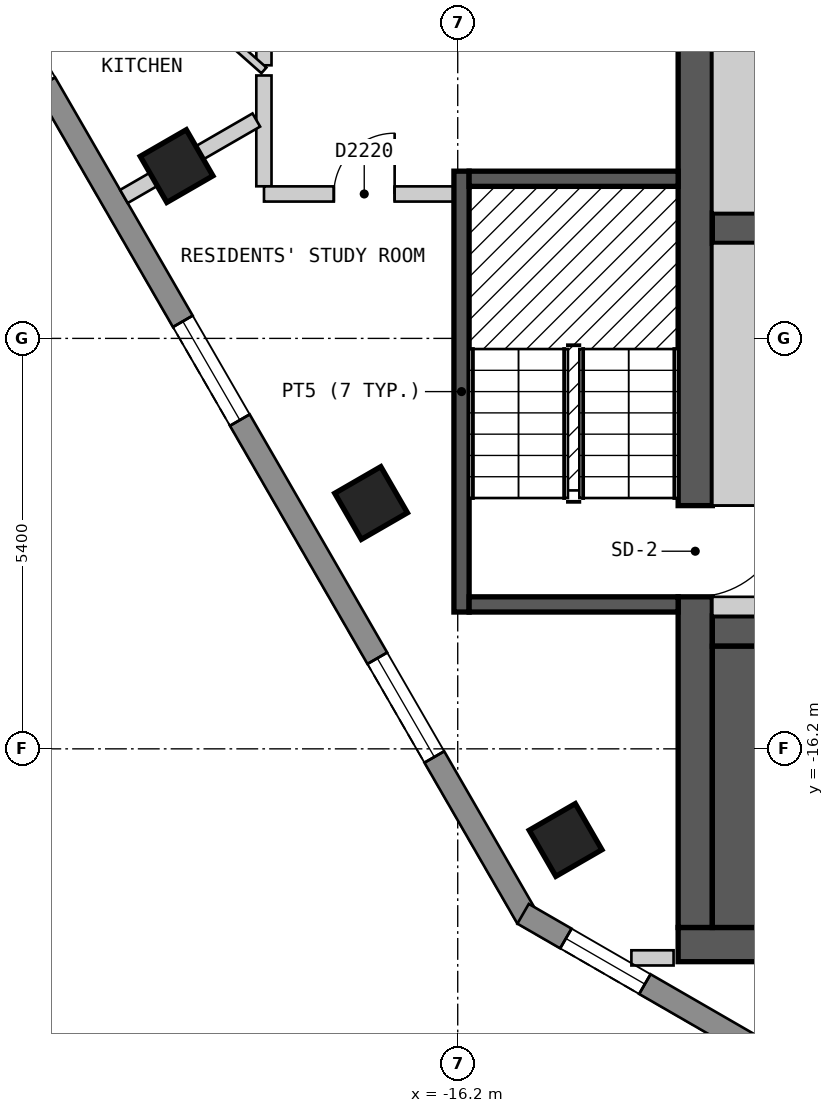
"""IFC4 building model, lengths in metres.
Left out: names, types, materials, properties, quantities, classifications, styles, units other than length and angle.
Written with IfcOpenShell. Run it as: python <this file> out.ifc"""

import sys

from ifc_helpers import new_model, si_unit, direction, frame, frame_2d, origin, origin_2d, place, context, subcontext, project, spatial, polyline, rectangle, outline, extrude, element, fill, save


model = new_model("IFC4")
c1 = context("Model", 3, precision=1e-05, world=origin(), true_north=direction((0.0, 1.0)))
c2 = subcontext(c1, "Body", "Model", "MODEL_VIEW")
j1 = project(units=[si_unit("LENGTHUNIT", "METRE"), si_unit("PLANEANGLEUNIT", "RADIAN")], contexts=[c1])
p1 = place(None, origin())
s1 = spatial("IfcSite", under=j1, at=p1, CompositionType="ELEMENT")
p2 = place(p1, origin())
s2 = spatial("IfcBuilding", under=s1, at=p2, CompositionType="ELEMENT")
p3 = place(p2, frame((0.0, 0.0, 223.8)))
s3 = spatial("IfcBuildingStorey", under=s2, at=p3, CompositionType="ELEMENT", Elevation=223.8)
for number, where, z_axis, x_axis in (
    (1, (-19.899, -8.533, 0.0), (0.0, 0.0, 1.0), (0.5, -0.866, 0.0)),
    (2, (-17.34, -12.966, 0.0), (0.0, 0.0, 1.0), (0.5, -0.866, 0.0)),
    (3, (-14.781, -17.399, 0.0), (0.0, 0.0, 1.0), (0.5, -0.866, 0.0)),
):
    element("IfcColumn", number, at=place(p3, frame(where, z_axis=z_axis, x_axis=x_axis)), inside=s3, PredefinedType="COLUMN", context=c2, shape_type="SweptSolid", body=[
        extrude(rectangle(XDim=0.7, YDim=0.7, at=origin_2d()), origin(), (0.0, 0.0, 1.0), 3.0),
    ])
p4 = place(p3, frame((-13.3, -18.775, 0.0), z_axis=(0.0, 0.0, 1.0), x_axis=(1.0, 0.0, 0.0)))
e4 = element("IfcWall", 4, at=p4, inside=s3, PredefinedType="SHEAR", context=c2, shape_type="SweptSolid", body=[
    extrude(rectangle(XDim=26.6, YDim=0.45, at=frame_2d((13.3, 0.0))), origin(), (0.0, 0.0, 1.0), 2.7),
])
p5 = place(p4, frame((9.3, 0.0, 0.0)))
e5 = element("IfcOpeningElement", 5, at=p5, cuts=e4, PredefinedType="OPENING", context=c2, shape_type="SweptSolid", body=[
    extrude(rectangle(XDim=0.9, YDim=2.1, at=frame_2d((0.45, 1.05))), frame((0.0, 0.235, 0.0), z_axis=(0.0, -1.0, 0.0), x_axis=(1.0, 0.0, 0.0)), (0.0, 0.0, 1.0), 0.47),
])
p6 = place(p3, frame((-13.075, -18.55, 0.0), z_axis=(0.0, 0.0, 1.0), x_axis=(0.0, 1.0, 0.0)))
e6 = element("IfcWall", 6, at=p6, inside=s3, PredefinedType="SHEAR", context=c2, shape_type="SweptSolid", body=[
    extrude(rectangle(XDim=13.1, YDim=0.45, at=frame_2d((6.55, 0.0))), origin(), (0.0, 0.0, 1.0), 2.7),
])
p7 = place(p6, frame((4.35, 0.0, 0.0)))
e7 = element("IfcOpeningElement", 7, at=p7, cuts=e6, PredefinedType="OPENING", context=c2, shape_type="SweptSolid", body=[
    extrude(rectangle(XDim=1.2, YDim=2.1, at=frame_2d((0.6, 1.05))), frame((0.0, 0.235, 0.0), z_axis=(0.0, -1.0, 0.0), x_axis=(1.0, 0.0, 0.0)), (0.0, 0.0, 1.0), 0.47),
])
p8 = place(p3, frame((-12.85, -14.65, 0.0), z_axis=(0.0, 0.0, 1.0), x_axis=(1.0, 0.0, 0.0)))
e8 = element("IfcWall", 8, at=p8, inside=s3, PredefinedType="SHEAR", context=c2, shape_type="SweptSolid", body=[
    extrude(rectangle(XDim=25.7, YDim=0.4, at=frame_2d((12.85, 0.0))), origin(), (0.0, 0.0, 1.0), 2.7),
])
p9 = place(p8, frame((2.05, 0.0, 0.0), z_axis=(0.0, 0.0, 1.0), x_axis=(-1.0, 0.0, 0.0)))
e9 = element("IfcOpeningElement", 9, at=p9, cuts=e8, PredefinedType="OPENING", context=c2, shape_type="SweptSolid", body=[
    extrude(rectangle(XDim=1.2, YDim=2.1, at=frame_2d((0.6, 1.05))), frame((0.0, 0.21, 0.0), z_axis=(0.0, -1.0, 0.0), x_axis=(1.0, 0.0, 0.0)), (0.0, 0.0, 1.0), 0.42),
])
p10 = place(p8, frame((24.9, 0.0, 0.0), z_axis=(0.0, 0.0, 1.0), x_axis=(-1.0, 0.0, 0.0)))
e10 = element("IfcOpeningElement", 10, at=p10, cuts=e8, PredefinedType="OPENING", context=c2, shape_type="SweptSolid", body=[
    extrude(rectangle(XDim=1.2, YDim=2.1, at=frame_2d((0.6, 1.05))), frame((0.0, 0.21, 0.0), z_axis=(0.0, -1.0, 0.0), x_axis=(1.0, 0.0, 0.0)), (0.0, 0.0, 1.0), 0.42),
])
p11 = place(p8, frame((8.75, 0.0, 0.0), z_axis=(0.0, 0.0, 1.0), x_axis=(-1.0, 0.0, 0.0)))
e11 = element("IfcOpeningElement", 11, at=p11, cuts=e8, PredefinedType="OPENING", context=c2, shape_type="SweptSolid", body=[
    extrude(rectangle(XDim=1.0, YDim=2.1, at=frame_2d((0.5, 1.05))), frame((0.0, 0.21, 0.0), z_axis=(0.0, -1.0, 0.0), x_axis=(1.0, 0.0, 0.0)), (0.0, 0.0, 1.0), 0.42),
])
p12 = place(p8, frame((11.5, 0.0, 0.0), z_axis=(0.0, 0.0, 1.0), x_axis=(-1.0, 0.0, 0.0)))
e12 = element("IfcOpeningElement", 12, at=p12, cuts=e8, PredefinedType="OPENING", context=c2, shape_type="SweptSolid", body=[
    extrude(rectangle(XDim=0.9, YDim=2.1, at=frame_2d((0.45, 1.05))), frame((0.0, 0.21, 0.0), z_axis=(0.0, -1.0, 0.0), x_axis=(1.0, 0.0, 0.0)), (0.0, 0.0, 1.0), 0.42),
])
p13 = place(p8, frame((14.3, 0.0, 0.0), z_axis=(0.0, 0.0, 1.0), x_axis=(-1.0, 0.0, 0.0)))
e13 = element("IfcOpeningElement", 13, at=p13, cuts=e8, PredefinedType="OPENING", context=c2, shape_type="SweptSolid", body=[
    extrude(rectangle(XDim=1.0, YDim=2.1, at=frame_2d((0.5, 1.05))), frame((0.0, 0.21, 0.0), z_axis=(0.0, -1.0, 0.0), x_axis=(1.0, 0.0, 0.0)), (0.0, 0.0, 1.0), 0.42),
])
p14 = place(p8, frame((17.9, 0.0, 0.0), z_axis=(0.0, 0.0, 1.0), x_axis=(-1.0, 0.0, 0.0)))
e14 = element("IfcOpeningElement", 14, at=p14, cuts=e8, PredefinedType="OPENING", context=c2, shape_type="SweptSolid", body=[
    extrude(rectangle(XDim=1.0, YDim=2.1, at=frame_2d((0.5, 1.05))), frame((0.0, 0.21, 0.0), z_axis=(0.0, -1.0, 0.0), x_axis=(1.0, 0.0, 0.0)), (0.0, 0.0, 1.0), 0.42),
])
p15 = place(p3, frame((-12.85, -9.35, 0.0), z_axis=(0.0, 0.0, 1.0), x_axis=(1.0, 0.0, 0.0)))
e15 = element("IfcWall", 15, at=p15, inside=s3, PredefinedType="SHEAR", context=c2, shape_type="SweptSolid", body=[
    extrude(rectangle(XDim=23.05, YDim=0.4, at=frame_2d((11.525, 0.0))), origin(), (0.0, 0.0, 1.0), 2.7),
])
p16 = place(p15, frame((1.45, 0.0, 0.0)))
e16 = element("IfcOpeningElement", 16, at=p16, cuts=e15, PredefinedType="OPENING", context=c2, shape_type="SweptSolid", body=[
    extrude(rectangle(XDim=1.1, YDim=2.1, at=frame_2d((0.55, 1.05))), frame((0.0, 0.21, 0.0), z_axis=(0.0, -1.0, 0.0), x_axis=(1.0, 0.0, 0.0)), (0.0, 0.0, 1.0), 0.42),
])
p17 = place(p15, frame((4.25, 0.0, 0.0)))
e17 = element("IfcOpeningElement", 17, at=p17, cuts=e15, PredefinedType="OPENING", context=c2, shape_type="SweptSolid", body=[
    extrude(rectangle(XDim=1.1, YDim=2.1, at=frame_2d((0.55, 1.05))), frame((0.0, 0.21, 0.0), z_axis=(0.0, -1.0, 0.0), x_axis=(1.0, 0.0, 0.0)), (0.0, 0.0, 1.0), 0.42),
])
p18 = place(p15, frame((7.05, 0.0, 0.0)))
e18 = element("IfcOpeningElement", 18, at=p18, cuts=e15, PredefinedType="OPENING", context=c2, shape_type="SweptSolid", body=[
    extrude(rectangle(XDim=1.1, YDim=2.1, at=frame_2d((0.55, 1.05))), frame((0.0, 0.21, 0.0), z_axis=(0.0, -1.0, 0.0), x_axis=(1.0, 0.0, 0.0)), (0.0, 0.0, 1.0), 0.42),
])
p19 = place(p15, frame((9.35, 0.0, 0.0)))
e19 = element("IfcOpeningElement", 19, at=p19, cuts=e15, PredefinedType="OPENING", context=c2, shape_type="SweptSolid", body=[
    extrude(rectangle(XDim=1.1, YDim=2.1, at=frame_2d((0.55, 1.05))), frame((0.0, 0.21, 0.0), z_axis=(0.0, -1.0, 0.0), x_axis=(1.0, 0.0, 0.0)), (0.0, 0.0, 1.0), 0.42),
])
p20 = place(p15, frame((11.65, 0.0, 0.0)))
e20 = element("IfcOpeningElement", 20, at=p20, cuts=e15, PredefinedType="OPENING", context=c2, shape_type="SweptSolid", body=[
    extrude(rectangle(XDim=1.1, YDim=2.1, at=frame_2d((0.55, 1.05))), frame((0.0, 0.21, 0.0), z_axis=(0.0, -1.0, 0.0), x_axis=(1.0, 0.0, 0.0)), (0.0, 0.0, 1.0), 0.42),
])
p21 = place(p15, frame((13.95, 0.0, 0.0)))
e21 = element("IfcOpeningElement", 21, at=p21, cuts=e15, PredefinedType="OPENING", context=c2, shape_type="SweptSolid", body=[
    extrude(rectangle(XDim=1.1, YDim=2.1, at=frame_2d((0.55, 1.05))), frame((0.0, 0.21, 0.0), z_axis=(0.0, -1.0, 0.0), x_axis=(1.0, 0.0, 0.0)), (0.0, 0.0, 1.0), 0.42),
])
p22 = place(p15, frame((16.25, 0.0, 0.0)))
e22 = element("IfcOpeningElement", 22, at=p22, cuts=e15, PredefinedType="OPENING", context=c2, shape_type="SweptSolid", body=[
    extrude(rectangle(XDim=1.1, YDim=2.1, at=frame_2d((0.55, 1.05))), frame((0.0, 0.21, 0.0), z_axis=(0.0, -1.0, 0.0), x_axis=(1.0, 0.0, 0.0)), (0.0, 0.0, 1.0), 0.42),
])
p23 = place(p15, frame((18.55, 0.0, 0.0)))
e23 = element("IfcOpeningElement", 23, at=p23, cuts=e15, PredefinedType="OPENING", context=c2, shape_type="SweptSolid", body=[
    extrude(rectangle(XDim=1.1, YDim=2.1, at=frame_2d((0.55, 1.05))), frame((0.0, 0.21, 0.0), z_axis=(0.0, -1.0, 0.0), x_axis=(1.0, 0.0, 0.0)), (0.0, 0.0, 1.0), 0.42),
])
p24 = place(p15, frame((20.95, 0.0, 0.0)))
e24 = element("IfcOpeningElement", 24, at=p24, cuts=e15, PredefinedType="OPENING", context=c2, shape_type="SweptSolid", body=[
    extrude(rectangle(XDim=1.1, YDim=2.1, at=frame_2d((0.55, 1.05))), frame((0.0, 0.21, 0.0), z_axis=(0.0, -1.0, 0.0), x_axis=(1.0, 0.0, 0.0)), (0.0, 0.0, 1.0), 0.42),
])
p25 = place(p3, frame((-23.599, -4.025, 0.0), z_axis=(0.0, 0.0, 1.0), x_axis=(0.500012653391, -0.866018098222, 0.0)))
e25 = element("IfcWall", 25, at=p25, inside=s3, PredefinedType="SOLIDWALL", context=c2, shape_type="SweptSolid", body=[
    extrude(outline(polyline([(0.0, -0.15), (16.628, -0.15), (16.548, 0.15), (0.08, 0.15), (0.0, -0.15)])), origin(), (0.0, 0.0, 1.0), 2.7),
])
p26 = place(p25, frame((2.444, 0.0, 0.15)))
e26 = element("IfcOpeningElement", 26, at=p26, cuts=e25, PredefinedType="OPENING", context=c2, shape_type="SweptSolid", body=[
    extrude(rectangle(XDim=1.5, YDim=2.1, at=frame_2d((0.75, 1.05))), frame((0.0, 0.16, 0.0), z_axis=(0.0, -1.0, 0.0), x_axis=(1.0, 0.0, 0.0)), (0.0, 0.0, 1.0), 0.32),
])
p27 = place(p25, frame((7.564, 0.0, 0.15)))
e27 = element("IfcOpeningElement", 27, at=p27, cuts=e25, PredefinedType="OPENING", context=c2, shape_type="SweptSolid", body=[
    extrude(rectangle(XDim=1.5, YDim=2.1, at=frame_2d((0.75, 1.05))), frame((0.0, 0.16, 0.0), z_axis=(0.0, -1.0, 0.0), x_axis=(1.0, 0.0, 0.0)), (0.0, 0.0, 1.0), 0.32),
])
p28 = place(p25, frame((12.682, 0.0, 0.15)))
e28 = element("IfcOpeningElement", 28, at=p28, cuts=e25, PredefinedType="OPENING", context=c2, shape_type="SweptSolid", body=[
    extrude(rectangle(XDim=1.5, YDim=2.1, at=frame_2d((0.75, 1.05))), frame((0.0, 0.16, 0.0), z_axis=(0.0, -1.0, 0.0), x_axis=(1.0, 0.0, 0.0)), (0.0, 0.0, 1.0), 0.32),
])
p29 = place(p3, frame((-15.34, -18.37, 0.0), z_axis=(0.0, 0.0, 1.0), x_axis=(0.866022959057, -0.500004234368, 0.0)))
e29 = element("IfcWall", 29, at=p29, inside=s3, PredefinedType="SOLIDWALL", context=c2, shape_type="SweptSolid", body=[
    extrude(outline(polyline([(0.0, -0.15), (5.0, -0.15), (4.92, 0.15), (0.08, 0.15), (0.0, -0.15)])), origin(), (0.0, 0.0, 1.0), 2.7),
])
p30 = place(p29, frame((0.65, 0.0, 0.15)))
e30 = element("IfcOpeningElement", 30, at=p30, cuts=e29, PredefinedType="OPENING", context=c2, shape_type="SweptSolid", body=[
    extrude(rectangle(XDim=1.2, YDim=2.1, at=frame_2d((0.6, 1.05))), frame((0.0, 0.16, 0.0), z_axis=(0.0, -1.0, 0.0), x_axis=(1.0, 0.0, 0.0)), (0.0, 0.0, 1.0), 0.32),
])
p31 = place(p3, frame((-18.75, -7.341, 0.0), z_axis=(0.0, 0.0, 1.0), x_axis=(0.0, -1.0, 0.0)))
e31 = element("IfcWall", 31, at=p31, inside=s3, PredefinedType="PARTITIONING", context=c2, shape_type="SweptSolid", body=[
    extrude(rectangle(XDim=1.458, YDim=0.2, at=frame_2d((0.729, 0.0))), origin(), (0.0, 0.0, 1.0), 2.7),
])
p32 = place(p3, frame((-18.749, -8.9, 0.0), z_axis=(0.0, 0.0, 1.0), x_axis=(1.0, 0.0, 0.0)))
e32 = element("IfcWall", 32, at=p32, inside=s3, PredefinedType="PARTITIONING", context=c2, shape_type="SweptSolid", body=[
    extrude(rectangle(XDim=2.699, YDim=0.2, at=frame_2d((1.35, 0.0))), origin(), (0.0, 0.0, 1.0), 2.7),
])
p33 = place(p32, frame((0.919, 0.0, 0.0)))
e33 = element("IfcOpeningElement", 33, at=p33, cuts=e32, PredefinedType="OPENING", context=c2, shape_type="SweptSolid", body=[
    extrude(rectangle(XDim=0.8, YDim=2.1, at=frame_2d((0.4, 1.05))), frame((0.0, 0.11, 0.0), z_axis=(0.0, -1.0, 0.0), x_axis=(1.0, 0.0, 0.0)), (0.0, 0.0, 1.0), 0.22),
])
p34 = place(p3, frame((-18.75, -7.207, 0.0), z_axis=(0.0, 0.0, 1.0), x_axis=(0.0, 1.0, 0.0)))
e34 = element("IfcWall", 34, at=p34, inside=s3, PredefinedType="PARTITIONING", context=c2, shape_type="SweptSolid", body=[
    extrude(rectangle(XDim=1.106, YDim=0.2, at=frame_2d((0.553, 0.0))), origin(), (0.0, 0.0, 1.0), 2.7),
])
p35 = place(p3, frame((-20.679, -5.565, 0.0), z_axis=(0.0, 0.0, 1.0), x_axis=(0.748495475416, -0.663139897217, 0.0)))
e35 = element("IfcWall", 35, at=p35, inside=s3, PredefinedType="PARTITIONING", context=c2, shape_type="SweptSolid", body=[
    extrude(rectangle(XDim=2.577, YDim=0.1, at=frame_2d((1.289, 0.0))), origin(), (0.0, 0.0, 1.0), 2.7),
])
p36 = place(p3, frame((-13.915, -18.95, 0.0), z_axis=(0.0, 0.0, 1.0), x_axis=(1.0, 0.0, 0.0)))
e36 = element("IfcWall", 36, at=p36, inside=s3, PredefinedType="PARTITIONING", context=c2, shape_type="SweptSolid", body=[
    extrude(rectangle(XDim=0.555, YDim=0.2, at=frame_2d((0.277, 0.0))), origin(), (0.0, 0.0, 1.0), 2.7),
])
p37 = place(p3, frame((-20.592, -8.933, 0.0), z_axis=(0.0, 0.0, 1.0), x_axis=(0.865941000796, 0.500146161777, 0.0)))
e37 = element("IfcWall", 37, at=p37, inside=s3, PredefinedType="PARTITIONING", context=c2, shape_type="SweptSolid", body=[
    extrude(rectangle(XDim=2.012, YDim=0.2, at=frame_2d((1.006, 0.0))), origin(), (0.0, 0.0, 1.0), 2.7),
])
p38 = place(p3, frame((-16.15, -14.4, 0.0), z_axis=(0.0, 0.0, 1.0), x_axis=(0.0, 1.0, 0.0)))
e38 = element("IfcWall", 38, at=p38, inside=s3, PredefinedType="SOLIDWALL", context=c2, shape_type="SweptSolid", body=[
    extrude(rectangle(XDim=5.8, YDim=0.2, at=frame_2d((2.9, 0.0))), origin(), (0.0, 0.0, 1.0), 2.7),
])
for number, where, z_axis, x_axis in (
    (39, (-16.05, -14.3, 0.0), (0.0, 0.0, 1.0), (1.0, 0.0, 0.0)),
    (40, (-16.05, -8.7, 0.0), (0.0, 0.0, 1.0), (1.0, 0.0, 0.0)),
):
    element("IfcWall", number, at=place(p3, frame(where, z_axis=z_axis, x_axis=x_axis)), inside=s3, PredefinedType="SOLIDWALL", context=c2, shape_type="SweptSolid", body=[
        extrude(rectangle(XDim=2.75, YDim=0.2, at=frame_2d((1.375, 0.0))), origin(), (0.0, 0.0, 1.0), 2.7),
    ])
p39 = place(p3, frame((-12.475, -18.55, 0.0), z_axis=(0.0, 0.0, 1.0), x_axis=(0.0, 1.0, 0.0)))
e41 = element("IfcWall", 41, at=p39, inside=s3, PredefinedType="SOLIDWALL", context=c2, shape_type="SweptSolid", body=[
    extrude(rectangle(XDim=3.7, YDim=0.75, at=frame_2d((1.85, 0.0))), origin(), (0.0, 0.0, 1.0), 2.7),
])
p40 = place(p3, frame((-12.85, -14.325, 0.0), z_axis=(0.0, 0.0, 1.0), x_axis=(1.0, 0.0, 0.0)))
e42 = element("IfcWall", 42, at=p40, inside=s3, PredefinedType="PARTITIONING", context=c2, shape_type="SweptSolid", body=[
    extrude(rectangle(XDim=0.75, YDim=0.25, at=frame_2d((0.375, 0.0))), origin(), (0.0, 0.0, 1.0), 2.7),
])
p41 = place(p3, frame((-12.475, -13.0, 0.0), z_axis=(0.0, 0.0, 1.0), x_axis=(0.0, 1.0, 0.0)))
e43 = element("IfcWall", 43, at=p41, inside=s3, PredefinedType="PARTITIONING", context=c2, shape_type="SweptSolid", body=[
    extrude(rectangle(XDim=3.45, YDim=0.75, at=frame_2d((1.725, 0.0))), origin(), (0.0, 0.0, 1.0), 2.7),
])
p42 = place(p3, frame((-12.475, -9.15, 0.0), z_axis=(0.0, 0.0, 1.0), x_axis=(0.0, 1.0, 0.0)))
e44 = element("IfcWall", 44, at=p42, inside=s3, PredefinedType="SOLIDWALL", context=c2, shape_type="SweptSolid", body=[
    extrude(rectangle(XDim=3.7, YDim=0.75, at=frame_2d((1.85, 0.0))), origin(), (0.0, 0.0, 1.0), 2.7),
])
p43 = place(p27, origin())
e45 = element("IfcWindow", 45, at=p43, inside=s3, PartitioningType="SINGLE_PANEL", PredefinedType="WINDOW", context=c2, shape_type="SweptSolid", body=[
    extrude(rectangle(XDim=1.5, YDim=2.1, at=frame_2d((0.75, 1.05))), frame((0.0, 0.03, 0.0), z_axis=(0.0, -1.0, 0.0), x_axis=(1.0, 0.0, 0.0)), (0.0, 0.0, 1.0), 0.06),
])
fill(e27, e45)
p44 = place(p28, origin())
e46 = element("IfcWindow", 46, at=p44, inside=s3, PartitioningType="SINGLE_PANEL", PredefinedType="WINDOW", context=c2, shape_type="SweptSolid", body=[
    extrude(rectangle(XDim=1.5, YDim=2.1, at=frame_2d((0.75, 1.05))), frame((0.0, 0.03, 0.0), z_axis=(0.0, -1.0, 0.0), x_axis=(1.0, 0.0, 0.0)), (0.0, 0.0, 1.0), 0.06),
])
fill(e28, e46)
p45 = place(p30, origin())
e47 = element("IfcWindow", 47, at=p45, inside=s3, PartitioningType="SINGLE_PANEL", PredefinedType="WINDOW", context=c2, shape_type="SweptSolid", body=[
    extrude(rectangle(XDim=1.2, YDim=2.1, at=frame_2d((0.6, 1.05))), frame((0.0, 0.03, 0.0), z_axis=(0.0, -1.0, 0.0), x_axis=(1.0, 0.0, 0.0)), (0.0, 0.0, 1.0), 0.06),
])
fill(e30, e47)
p46 = place(p33, origin())
e48 = element("IfcDoor", 48, at=p46, inside=s3, OperationType="SINGLE_SWING_RIGHT", PredefinedType="DOOR", context=c2, shape_type="SweptSolid", body=[
    extrude(rectangle(XDim=0.8, YDim=2.1, at=frame_2d((0.4, 1.05))), frame((0.0, 0.025, 0.0), z_axis=(0.0, -1.0, 0.0), x_axis=(1.0, 0.0, 0.0)), (0.0, 0.0, 1.0), 0.05),
])
fill(e33, e48)
p47 = place(p7, origin())
e49 = element("IfcDoor", 49, at=p47, inside=s3, OperationType="SINGLE_SWING_RIGHT", PredefinedType="DOOR", context=c2, shape_type="SweptSolid", body=[
    extrude(rectangle(XDim=1.2, YDim=2.1, at=frame_2d((0.6, 1.05))), frame((0.0, 0.025, 0.0), z_axis=(0.0, -1.0, 0.0), x_axis=(1.0, 0.0, 0.0)), (0.0, 0.0, 1.0), 0.05),
])
fill(e7, e49)
save(model, sys.argv[1])
